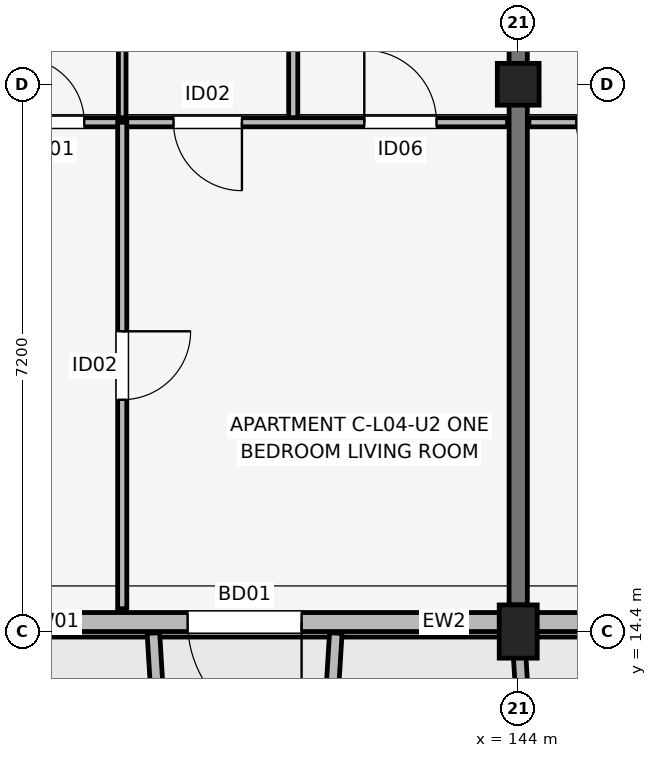
"""IFC4 building model, lengths in metres.
Left out: names, types, materials, properties, quantities, classifications, styles, units other than length and angle.
Written with IfcOpenShell. Run it as: python <this file> out.ifc"""

import sys

from ifc_helpers import new_model, si_unit, direction, frame, frame_2d, origin, origin_2d, place, context, subcontext, project, spatial, rectangle, extrude, element, fill, save


model = new_model("IFC4")
c1 = context("Model", 3, precision=1e-05, world=origin(), true_north=direction((0.0, 1.0)))
c2 = subcontext(c1, "Body", "Model", "MODEL_VIEW")
j1 = project(units=[si_unit("LENGTHUNIT", "METRE"), si_unit("PLANEANGLEUNIT", "RADIAN")], contexts=[c1])
p1 = place(None, origin())
s1 = spatial("IfcSite", under=j1, at=p1, CompositionType="ELEMENT")
p2 = place(p1, origin())
s2 = spatial("IfcBuilding", under=s1, at=p2, CompositionType="ELEMENT")
p3 = place(p2, frame((0.0, 0.0, 15.0)))
s3 = spatial("IfcBuildingStorey", under=s2, at=p3, CompositionType="ELEMENT", Elevation=15.0)
p4 = place(p3, frame((144.0, 14.4, 0.0), z_axis=(0.0, 0.0, 1.0), x_axis=(1.0, 0.0, 0.0)))
e1 = element("IfcColumn", 1, at=p4, inside=s3, PredefinedType="COLUMN", context=c2, shape_type="SweptSolid", body=[
    extrude(rectangle(XDim=0.5, YDim=0.7, at=origin_2d()), origin(), (0.0, 0.0, 1.0), 3.15),
])
p5 = place(p3, frame((144.0, 21.6, 0.0), z_axis=(0.0, 0.0, 1.0), x_axis=(1.0, 0.0, 0.0)))
e2 = element("IfcColumn", 2, at=p5, inside=s3, PredefinedType="COLUMN", context=c2, shape_type="SweptSolid", body=[
    extrude(rectangle(XDim=0.55, YDim=0.55, at=origin_2d()), origin(), (0.0, 0.0, 1.0), 3.15),
])
p6 = place(p3, frame((144.0, 14.75, 0.0), z_axis=(0.0, 0.0, 1.0), x_axis=(0.0, 1.0, 0.0)))
e3 = element("IfcWall", 3, at=p6, inside=s3, PredefinedType="SHEAR", context=c2, shape_type="SweptSolid", body=[
    extrude(rectangle(XDim=9.4, YDim=0.24, at=frame_2d((4.7, 0.0))), origin(), (0.0, 0.0, 1.0), 3.15),
])
p7 = place(p3, frame((132.6, 14.525, 0.0), z_axis=(0.0, 0.0, 1.0), x_axis=(1.0, 0.0, 0.0)))
e4 = element("IfcWall", 4, at=p7, inside=s3, PredefinedType="SOLIDWALL", context=c2, shape_type="SweptSolid", body=[
    extrude(rectangle(XDim=30.0, YDim=0.25, at=frame_2d((15.0, 0.0))), origin(), (0.0, 0.0, 1.0), 2.43),
])
p8 = place(p7, frame((8.55, 0.0, 0.0), z_axis=(0.0, 0.0, 1.0), x_axis=(-1.0, 0.0, 0.0)))
e5 = element("IfcOpeningElement", 5, at=p8, cuts=e4, PredefinedType="OPENING", context=c2, shape_type="SweptSolid", body=[
    extrude(rectangle(XDim=1.5, YDim=2.15, at=frame_2d((0.75, 1.075))), frame((0.0, 0.135, 0.0), z_axis=(0.0, -1.0, 0.0), x_axis=(1.0, 0.0, 0.0)), (0.0, 0.0, 1.0), 0.27),
])
p9 = place(p7, frame((23.1, 0.0, 0.0), z_axis=(0.0, 0.0, 1.0), x_axis=(-1.0, 0.0, 0.0)))
e6 = element("IfcOpeningElement", 6, at=p9, cuts=e4, PredefinedType="OPENING", context=c2, shape_type="SweptSolid", body=[
    extrude(rectangle(XDim=1.8, YDim=2.15, at=frame_2d((0.9, 1.075))), frame((0.0, 0.135, 0.0), z_axis=(0.0, -1.0, 0.0), x_axis=(1.0, 0.0, 0.0)), (0.0, 0.0, 1.0), 0.27),
])
p10 = place(p7, frame((2.555, 0.0, 0.75)))
e7 = element("IfcOpeningElement", 7, at=p10, cuts=e4, PredefinedType="OPENING", context=c2, shape_type="SweptSolid", body=[
    extrude(rectangle(XDim=1.22, YDim=1.5, at=frame_2d((0.61, 0.75))), frame((0.0, 0.135, 0.0), z_axis=(0.0, -1.0, 0.0), x_axis=(1.0, 0.0, 0.0)), (0.0, 0.0, 1.0), 0.27),
])
p11 = place(p7, frame((5.035, 0.0, 0.75)))
e8 = element("IfcOpeningElement", 8, at=p11, cuts=e4, PredefinedType="OPENING", context=c2, shape_type="SweptSolid", body=[
    extrude(rectangle(XDim=0.6, YDim=1.25, at=frame_2d((0.3, 0.625))), frame((0.0, 0.135, 0.0), z_axis=(0.0, -1.0, 0.0), x_axis=(1.0, 0.0, 0.0)), (0.0, 0.0, 1.0), 0.27),
])
p12 = place(p7, frame((12.3, 0.0, 0.75)))
e9 = element("IfcOpeningElement", 9, at=p12, cuts=e4, PredefinedType="OPENING", context=c2, shape_type="SweptSolid", body=[
    extrude(rectangle(XDim=0.72, YDim=1.35, at=frame_2d((0.36, 0.675))), frame((0.0, 0.135, 0.0), z_axis=(0.0, -1.0, 0.0), x_axis=(1.0, 0.0, 0.0)), (0.0, 0.0, 1.0), 0.27),
])
p13 = place(p7, frame((14.0, 0.0, 0.67)))
e10 = element("IfcOpeningElement", 10, at=p13, cuts=e4, PredefinedType="OPENING", context=c2, shape_type="SweptSolid", body=[
    extrude(rectangle(XDim=2.0, YDim=1.65, at=frame_2d((1.0, 0.825))), frame((0.0, 0.135, 0.0), z_axis=(0.0, -1.0, 0.0), x_axis=(1.0, 0.0, 0.0)), (0.0, 0.0, 1.0), 0.27),
])
p14 = place(p7, frame((19.37, 0.0, 0.75)))
e11 = element("IfcOpeningElement", 11, at=p14, cuts=e4, PredefinedType="OPENING", context=c2, shape_type="SweptSolid", body=[
    extrude(rectangle(XDim=0.98, YDim=1.45, at=frame_2d((0.49, 0.725))), frame((0.0, 0.135, 0.0), z_axis=(0.0, -1.0, 0.0), x_axis=(1.0, 0.0, 0.0)), (0.0, 0.0, 1.0), 0.27),
])
p15 = place(p7, frame((26.215, 0.0, 0.7)))
e12 = element("IfcOpeningElement", 12, at=p15, cuts=e4, PredefinedType="OPENING", context=c2, shape_type="SweptSolid", body=[
    extrude(rectangle(XDim=1.86, YDim=1.6, at=frame_2d((0.93, 0.8))), frame((0.0, 0.135, 0.0), z_axis=(0.0, -1.0, 0.0), x_axis=(1.0, 0.0, 0.0)), (0.0, 0.0, 1.0), 0.27),
])
for number, where, z_axis, x_axis in (
    (13, (139.2, 14.38, 0.0), (0.0, 0.0, 1.0), (0.061, -0.998, 0.0)),
    (14, (141.6, 14.38, 0.0), (0.0, 0.0, 1.0), (-0.061, -0.998, 0.0)),
):
    element("IfcWall", number, at=place(p3, frame(where, z_axis=z_axis, x_axis=x_axis)), inside=s3, PredefinedType="ELEMENTEDWALL", context=c2, shape_type="SweptSolid", body=[
        extrude(rectangle(XDim=1.964, YDim=0.165, at=frame_2d((0.982, 0.0))), origin(), (0.0, 0.0, 1.0), 2.53),
    ])
p16 = place(p3, frame((144.0, 14.38, 0.0), z_axis=(0.0, 0.0, 1.0), x_axis=(0.061170732449, -0.998127317276, 0.0)))
e15 = element("IfcWall", 15, at=p16, inside=s3, PredefinedType="ELEMENTEDWALL", context=c2, shape_type="SweptSolid", body=[
    extrude(rectangle(XDim=1.964, YDim=0.165, at=frame_2d((0.982, 0.0))), origin(), (0.0, 0.0, 1.0), 2.95),
])
p17 = place(p3, frame((138.79, 21.1, 0.0), z_axis=(0.0, 0.0, 1.0), x_axis=(0.0, 1.0, 0.0)))
e16 = element("IfcWall", 16, at=p17, inside=s3, PredefinedType="PARTITIONING", context=c2, shape_type="SweptSolid", body=[
    extrude(rectangle(XDim=3.2, YDim=0.1, at=frame_2d((1.6, 0.0))), origin(), (0.0, 0.0, 1.0), 2.375),
])
p18 = place(p3, frame((141.04, 21.1, 0.0), z_axis=(0.0, 0.0, 1.0), x_axis=(0.0, 1.0, 0.0)))
e17 = element("IfcWall", 17, at=p18, inside=s3, PredefinedType="PARTITIONING", context=c2, shape_type="SweptSolid", body=[
    extrude(rectangle(XDim=3.2, YDim=0.12, at=frame_2d((1.6, 0.0))), origin(), (0.0, 0.0, 1.0), 2.375),
])
p19 = place(p3, frame((136.94, 21.1, 0.0), z_axis=(0.0, 0.0, 1.0), x_axis=(1.0, 0.0, 0.0)))
e18 = element("IfcWall", 18, at=p19, inside=s3, PredefinedType="PARTITIONING", context=c2, shape_type="SweptSolid", body=[
    extrude(rectangle(XDim=6.92, YDim=0.12, at=frame_2d((3.46, 0.0))), origin(), (0.0, 0.0, 1.0), 2.38),
])
p20 = place(p19, frame((0.5, 0.0, 0.0)))
e19 = element("IfcOpeningElement", 19, at=p20, cuts=e18, PredefinedType="OPENING", context=c2, shape_type="SweptSolid", body=[
    extrude(rectangle(XDim=0.85, YDim=2.08, at=frame_2d((0.425, 1.04))), frame((0.0, 0.07, 0.0), z_axis=(0.0, -1.0, 0.0), x_axis=(1.0, 0.0, 0.0)), (0.0, 0.0, 1.0), 0.14),
])
p21 = place(p19, frame((3.425, 0.0, 0.0), z_axis=(0.0, 0.0, 1.0), x_axis=(-1.0, 0.0, 0.0)))
e20 = element("IfcOpeningElement", 20, at=p21, cuts=e18, PredefinedType="OPENING", context=c2, shape_type="SweptSolid", body=[
    extrude(rectangle(XDim=0.9, YDim=2.08, at=frame_2d((0.45, 1.04))), frame((0.0, 0.07, 0.0), z_axis=(0.0, -1.0, 0.0), x_axis=(1.0, 0.0, 0.0)), (0.0, 0.0, 1.0), 0.14),
])
p22 = place(p19, frame((5.035, 0.0, 0.0)))
e21 = element("IfcOpeningElement", 21, at=p22, cuts=e18, PredefinedType="OPENING", context=c2, shape_type="SweptSolid", body=[
    extrude(rectangle(XDim=0.95, YDim=2.08, at=frame_2d((0.475, 1.04))), frame((0.0, 0.07, 0.0), z_axis=(0.0, -1.0, 0.0), x_axis=(1.0, 0.0, 0.0)), (0.0, 0.0, 1.0), 0.14),
])
p23 = place(p3, frame((138.79, 14.7, 0.0), z_axis=(0.0, 0.0, 1.0), x_axis=(0.0, 1.0, 0.0)))
e22 = element("IfcWall", 22, at=p23, inside=s3, PredefinedType="PARTITIONING", context=c2, shape_type="SweptSolid", body=[
    extrude(rectangle(XDim=6.4, YDim=0.12, at=frame_2d((3.2, 0.0))), origin(), (0.0, 0.0, 1.0), 2.38),
])
p24 = place(p23, frame((3.65, 0.0, 0.0), z_axis=(0.0, 0.0, 1.0), x_axis=(-1.0, 0.0, 0.0)))
e23 = element("IfcOpeningElement", 23, at=p24, cuts=e22, PredefinedType="OPENING", context=c2, shape_type="SweptSolid", body=[
    extrude(rectangle(XDim=0.9, YDim=2.08, at=frame_2d((0.45, 1.04))), frame((0.0, 0.07, 0.0), z_axis=(0.0, -1.0, 0.0), x_axis=(1.0, 0.0, 0.0)), (0.0, 0.0, 1.0), 0.14),
])
p25 = place(p3, frame((144.14, 21.1, 0.0), z_axis=(0.0, 0.0, 1.0), x_axis=(1.0, 0.0, 0.0)))
e24 = element("IfcWall", 24, at=p25, inside=s3, PredefinedType="PARTITIONING", context=c2, shape_type="SweptSolid", body=[
    extrude(rectangle(XDim=6.92, YDim=0.12, at=frame_2d((3.46, 0.0))), origin(), (0.0, 0.0, 1.0), 2.38),
])
p26 = place(p25, frame((1.475, 0.0, 0.0), z_axis=(0.0, 0.0, 1.0), x_axis=(-1.0, 0.0, 0.0)))
e25 = element("IfcOpeningElement", 25, at=p26, cuts=e24, PredefinedType="OPENING", context=c2, shape_type="SweptSolid", body=[
    extrude(rectangle(XDim=0.85, YDim=2.08, at=frame_2d((0.425, 1.04))), frame((0.0, 0.07, 0.0), z_axis=(0.0, -1.0, 0.0), x_axis=(1.0, 0.0, 0.0)), (0.0, 0.0, 1.0), 0.14),
])
p27 = place(p25, frame((2.625, 0.0, 0.0)))
e26 = element("IfcOpeningElement", 26, at=p27, cuts=e24, PredefinedType="OPENING", context=c2, shape_type="SweptSolid", body=[
    extrude(rectangle(XDim=0.9, YDim=2.08, at=frame_2d((0.45, 1.04))), frame((0.0, 0.07, 0.0), z_axis=(0.0, -1.0, 0.0), x_axis=(1.0, 0.0, 0.0)), (0.0, 0.0, 1.0), 0.14),
])
p28 = place(p25, frame((5.96, 0.0, 0.0), z_axis=(0.0, 0.0, 1.0), x_axis=(-1.0, 0.0, 0.0)))
e27 = element("IfcOpeningElement", 27, at=p28, cuts=e24, PredefinedType="OPENING", context=c2, shape_type="SweptSolid", body=[
    extrude(rectangle(XDim=0.95, YDim=2.08, at=frame_2d((0.475, 1.04))), frame((0.0, 0.07, 0.0), z_axis=(0.0, -1.0, 0.0), x_axis=(1.0, 0.0, 0.0)), (0.0, 0.0, 1.0), 0.14),
])
p29 = place(p8, origin())
e28 = element("IfcDoor", 28, at=p29, inside=s3, OperationType="SINGLE_SWING_RIGHT", PredefinedType="DOOR", context=c2, shape_type="SweptSolid", body=[
    extrude(rectangle(XDim=1.5, YDim=2.15, at=frame_2d((0.75, 1.075))), frame((0.0, 0.025, 0.0), z_axis=(0.0, -1.0, 0.0), x_axis=(1.0, 0.0, 0.0)), (0.0, 0.0, 1.0), 0.05),
])
fill(e5, e28)
p30 = place(p11, origin())
e29 = element("IfcWindow", 29, at=p30, inside=s3, PartitioningType="SINGLE_PANEL", PredefinedType="WINDOW", context=c2, shape_type="SweptSolid", body=[
    extrude(rectangle(XDim=0.6, YDim=1.25, at=frame_2d((0.3, 0.625))), frame((0.0, 0.03, 0.0), z_axis=(0.0, -1.0, 0.0), x_axis=(1.0, 0.0, 0.0)), (0.0, 0.0, 1.0), 0.06),
])
fill(e8, e29)
p31 = place(p20, origin())
e30 = element("IfcDoor", 30, at=p31, inside=s3, OperationType="SINGLE_SWING_LEFT", PredefinedType="DOOR", context=c2, shape_type="SweptSolid", body=[
    extrude(rectangle(XDim=0.85, YDim=2.08, at=frame_2d((0.425, 1.04))), frame((0.0, 0.025, 0.0), z_axis=(0.0, -1.0, 0.0), x_axis=(1.0, 0.0, 0.0)), (0.0, 0.0, 1.0), 0.05),
])
fill(e19, e30)
p32 = place(p21, origin())
e31 = element("IfcDoor", 31, at=p32, inside=s3, OperationType="SINGLE_SWING_RIGHT", PredefinedType="DOOR", context=c2, shape_type="SweptSolid", body=[
    extrude(rectangle(XDim=0.9, YDim=2.08, at=frame_2d((0.45, 1.04))), frame((0.0, 0.025, 0.0), z_axis=(0.0, -1.0, 0.0), x_axis=(1.0, 0.0, 0.0)), (0.0, 0.0, 1.0), 0.05),
])
fill(e20, e31)
p33 = place(p22, origin())
e32 = element("IfcDoor", 32, at=p33, inside=s3, OperationType="SINGLE_SWING_LEFT", PredefinedType="DOOR", context=c2, shape_type="SweptSolid", body=[
    extrude(rectangle(XDim=0.95, YDim=2.08, at=frame_2d((0.475, 1.04))), frame((0.0, 0.025, 0.0), z_axis=(0.0, -1.0, 0.0), x_axis=(1.0, 0.0, 0.0)), (0.0, 0.0, 1.0), 0.05),
])
fill(e21, e32)
p34 = place(p24, origin())
e33 = element("IfcDoor", 33, at=p34, inside=s3, OperationType="SINGLE_SWING_RIGHT", PredefinedType="DOOR", context=c2, shape_type="SweptSolid", body=[
    extrude(rectangle(XDim=0.9, YDim=2.08, at=frame_2d((0.45, 1.04))), frame((0.0, 0.025, 0.0), z_axis=(0.0, -1.0, 0.0), x_axis=(1.0, 0.0, 0.0)), (0.0, 0.0, 1.0), 0.05),
])
fill(e23, e33)
p35 = place(p26, origin())
e34 = element("IfcDoor", 34, at=p35, inside=s3, OperationType="SINGLE_SWING_RIGHT", PredefinedType="DOOR", context=c2, shape_type="SweptSolid", body=[
    extrude(rectangle(XDim=0.85, YDim=2.08, at=frame_2d((0.425, 1.04))), frame((0.0, 0.025, 0.0), z_axis=(0.0, -1.0, 0.0), x_axis=(1.0, 0.0, 0.0)), (0.0, 0.0, 1.0), 0.05),
])
fill(e25, e34)
save(model, sys.argv[1])
